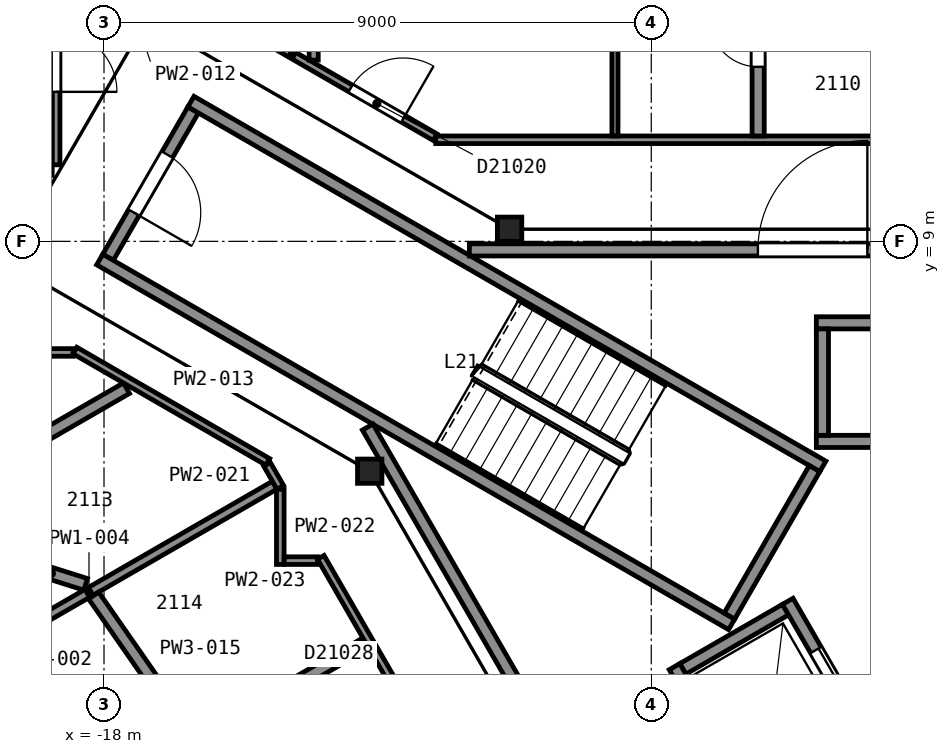
"""IFC4 building model, lengths in metres.
Left out: names, types, materials, properties, quantities, classifications, styles, units other than length and angle.
Written with IfcOpenShell. Run it as: python <this file> out.ifc"""

import sys

from ifc_helpers import new_model, si_unit, direction, frame, frame_2d, origin, origin_2d, place, context, subcontext, project, spatial, rectangle, i_section, extrude, element, fill, save


model = new_model("IFC4")
c1 = context("Model", 3, precision=1e-05, world=origin(), true_north=direction((0.0, 1.0)))
c2 = subcontext(c1, "Body", "Model", "MODEL_VIEW")
j1 = project(units=[si_unit("LENGTHUNIT", "METRE"), si_unit("PLANEANGLEUNIT", "RADIAN")], contexts=[c1])
p1 = place(None, origin())
s1 = spatial("IfcSite", under=j1, at=p1, CompositionType="ELEMENT")
p2 = place(p1, origin())
s2 = spatial("IfcBuilding", under=s1, at=p2, CompositionType="ELEMENT")
p3 = place(p2, frame((0.0, 0.0, 92.8)))
s3 = spatial("IfcBuildingStorey", under=s2, at=p3, CompositionType="ELEMENT", Elevation=92.8)
for number, where, z_axis, x_axis in (
    (1, (-11.33, 9.2, 0.0), (0.0, 0.0, 1.0), (1.0, 0.0, 0.0)),
    (2, (-13.63, 5.22, 0.0), (0.0, 0.0, 1.0), (1.0, 0.0, 0.0)),
):
    element("IfcColumn", number, at=place(p3, frame(where, z_axis=z_axis, x_axis=x_axis)), inside=s3, PredefinedType="COLUMN", context=c2, shape_type="SweptSolid", body=[
        extrude(i_section(OverallWidth=0.401, OverallDepth=0.399, WebThickness=0.025, FlangeThickness=0.04, FilletRadius=0.015, at=origin_2d()), origin(), (0.0, 0.0, 1.0), 3.6),
    ])
p4 = place(p3, frame((-16.534, 11.162, 0.0), z_axis=(0.0, 0.0, 1.0), x_axis=(-0.49998411664, -0.866034573852, 0.0)))
e3 = element("IfcWall", 3, at=p4, inside=s3, PredefinedType="PARTITIONING", context=c2, shape_type="SweptSolid", body=[
    extrude(rectangle(XDim=2.8, YDim=0.2, at=frame_2d((1.4, 0.0))), origin(), (0.0, 0.0, 1.0), 3.35),
])
p5 = place(p4, frame((0.85, 0.0, 0.0)))
e4 = element("IfcOpeningElement", 4, at=p5, cuts=e3, PredefinedType="OPENING", context=c2, shape_type="SweptSolid", body=[
    extrude(rectangle(XDim=1.1, YDim=2.1, at=frame_2d((0.55, 1.05))), frame((0.0, 0.11, 0.0), z_axis=(0.0, -1.0, 0.0), x_axis=(1.0, 0.0, 0.0)), (0.0, 0.0, 1.0), 0.22),
])
for number, where, z_axis, x_axis in (
    (5, (-7.678, 2.701, 0.0), (0.0, 0.0, 1.0), (-0.866, 0.5, 0.0)),
    (6, (-6.178, 5.299, 0.0), (0.0, 0.0, 1.0), (-0.866, 0.5, 0.0)),
):
    element("IfcWall", number, at=place(p3, frame(where, z_axis=z_axis, x_axis=x_axis)), inside=s3, PredefinedType="PARTITIONING", context=c2, shape_type="SweptSolid", body=[
        extrude(rectangle(XDim=12.0, YDim=0.2, at=frame_2d((6.0, 0.0))), origin(), (0.0, 0.0, 1.0), 3.35),
    ])
p6 = place(p3, frame((-6.315, 5.262, 0.0), z_axis=(0.0, 0.0, 1.0), x_axis=(-0.500049511043, -0.865996816683, 0.0)))
e7 = element("IfcWall", 7, at=p6, inside=s3, PredefinedType="PARTITIONING", context=c2, shape_type="SweptSolid", body=[
    extrude(rectangle(XDim=2.8, YDim=0.2, at=frame_2d((1.4, 0.0))), origin(), (0.0, 0.0, 1.0), 3.35),
])
for number, where, z_axis, x_axis in (
    (8, (-6.285, 5.71, 0.0), (0.0, 0.0, 1.0), (1.0, 0.0, 0.0)),
    (9, (-6.285, 7.66, 0.0), (0.0, 0.0, 1.0), (1.0, 0.0, 0.0)),
):
    element("IfcWall", number, at=place(p3, frame(where, z_axis=z_axis, x_axis=x_axis)), inside=s3, PredefinedType="PARTITIONING", context=c2, shape_type="SweptSolid", body=[
        extrude(rectangle(XDim=2.35, YDim=0.2, at=frame_2d((1.175, 0.0))), origin(), (0.0, 0.0, 1.0), 3.6),
    ])
p7 = place(p3, frame((-8.48, 1.969, 0.0), z_axis=(0.0, 0.0, 1.0), x_axis=(0.866000020948, 0.500043961785, 0.0)))
e10 = element("IfcWall", 10, at=p7, inside=s3, PredefinedType="PARTITIONING", context=c2, shape_type="SweptSolid", body=[
    extrude(rectangle(XDim=1.95, YDim=0.2, at=frame_2d((0.975, 0.0))), origin(), (0.0, 0.0, 1.0), 3.6),
])
p8 = place(p3, frame((-6.185, 5.81, 0.0), z_axis=(0.0, 0.0, 1.0), x_axis=(0.0, 1.0, 0.0)))
e11 = element("IfcWall", 11, at=p8, inside=s3, PredefinedType="PARTITIONING", context=c2, shape_type="SweptSolid", body=[
    extrude(rectangle(XDim=1.75, YDim=0.2, at=frame_2d((0.875, 0.0))), origin(), (0.0, 0.0, 1.0), 3.6),
])
p9 = place(p3, frame((-5.28, 0.525, 0.0), z_axis=(0.0, 0.0, 1.0), x_axis=(-0.500037662692, 0.866003658127, 0.0)))
e12 = element("IfcWall", 12, at=p9, inside=s3, PredefinedType="PARTITIONING", context=c2, shape_type="SweptSolid", body=[
    extrude(rectangle(XDim=2.95, YDim=0.2, at=frame_2d((1.475, 0.0))), origin(), (0.0, 0.0, 1.0), 3.6),
])
p10 = place(p9, frame((0.925, 0.0, 0.0)))
e13 = element("IfcOpeningElement", 13, at=p10, cuts=e12, PredefinedType="OPENING", context=c2, shape_type="SweptSolid", body=[
    extrude(rectangle(XDim=1.1, YDim=2.1, at=frame_2d((0.55, 1.05))), frame((0.0, 0.11, 0.0), z_axis=(0.0, -1.0, 0.0), x_axis=(1.0, 0.0, 0.0)), (0.0, 0.0, 1.0), 0.22),
])
p11 = place(p3, frame((-7.242, -0.376, 0.0), z_axis=(0.0, 0.0, 1.0), x_axis=(-0.499996545922, 0.866027397988, 0.0)))
e14 = element("IfcWall", 14, at=p11, inside=s3, PredefinedType="PARTITIONING", context=c2, shape_type="SweptSolid", body=[
    extrude(rectangle(XDim=2.75, YDim=0.2, at=frame_2d((1.375, 0.0))), origin(), (0.0, 0.0, 1.0), 3.6),
])
p12 = place(p3, frame((-13.664, 5.946, 0.0), z_axis=(0.0, 0.0, 1.0), x_axis=(0.499994327219, -0.866028678941, 0.0)))
e15 = element("IfcWall", 15, at=p12, inside=s3, PredefinedType="PARTITIONING", context=c2, shape_type="SweptSolid", body=[
    extrude(rectangle(XDim=23.968, YDim=0.2, at=frame_2d((11.984, 0.0))), origin(), (0.0, 0.0, 1.0), 3.35),
])
p13 = place(p3, frame((0.263, 8.86, 0.0), z_axis=(0.0, 0.0, 1.0), x_axis=(-1.0, 0.0, 0.0)))
e16 = element("IfcWall", 16, at=p13, inside=s3, PredefinedType="PARTITIONING", context=c2, shape_type="SweptSolid", body=[
    extrude(rectangle(XDim=12.254, YDim=0.2, at=frame_2d((6.127, 0.0))), origin(), (0.0, 0.0, 1.0), 3.35),
])
p14 = place(p13, frame((5.709, 0.0, 0.0)))
e17 = element("IfcOpeningElement", 17, at=p14, cuts=e16, PredefinedType="OPENING", context=c2, shape_type="SweptSolid", body=[
    extrude(rectangle(XDim=1.8, YDim=2.1, at=frame_2d((0.9, 1.05))), frame((0.0, 0.11, 0.0), z_axis=(0.0, -1.0, 0.0), x_axis=(1.0, 0.0, 0.0)), (0.0, 0.0, 1.0), 0.22),
])
p15 = place(p3, frame((-21.263, 4.296, 0.0), z_axis=(0.0, 0.0, 1.0), x_axis=(0.95341383314, -0.301665481582, 0.0)))
e18 = element("IfcWall", 18, at=p15, inside=s3, PredefinedType="PARTITIONING", context=c2, shape_type="SweptSolid", body=[
    extrude(rectangle(XDim=3.106, YDim=0.2, at=frame_2d((1.553, 0.0))), origin(), (0.0, 0.0, 1.0), 2.613),
])
p16 = place(p15, frame((1.125, 0.0, 0.0)))
e19 = element("IfcOpeningElement", 19, at=p16, cuts=e18, PredefinedType="OPENING", context=c2, shape_type="SweptSolid", body=[
    extrude(rectangle(XDim=0.8, YDim=2.1, at=frame_2d((0.4, 1.05))), frame((0.0, 0.11, 0.0), z_axis=(0.0, -1.0, 0.0), x_axis=(1.0, 0.0, 0.0)), (0.0, 0.0, 1.0), 0.22),
])
p17 = place(p3, frame((-21.565, 4.314, 0.0), z_axis=(0.0, 0.0, 1.0), x_axis=(0.866058501026, 0.499942669514, 0.0)))
e20 = element("IfcWall", 20, at=p17, inside=s3, PredefinedType="PARTITIONING", context=c2, shape_type="SweptSolid", body=[
    extrude(rectangle(XDim=4.542, YDim=0.2, at=frame_2d((2.271, 0.0))), origin(), (0.0, 0.0, 1.0), 2.613),
])
p18 = place(p3, frame((-21.301, 1.464, 0.0), z_axis=(0.0, 0.0, 1.0), x_axis=(0.866055299146, 0.49994821614, 0.0)))
e21 = element("IfcWall", 21, at=p18, inside=s3, PredefinedType="PARTITIONING", context=c2, shape_type="SweptSolid", body=[
    extrude(rectangle(XDim=7.052, YDim=0.15, at=frame_2d((3.526, 0.0))), origin(), (0.0, 0.0, 1.0), 2.613),
])
p19 = place(p3, frame((-21.022, 7.173, 0.0), z_axis=(0.0, 0.0, 1.0), x_axis=(1.0, 0.0, 0.0)))
e22 = element("IfcWall", 22, at=p19, inside=s3, PredefinedType="PARTITIONING", context=c2, shape_type="SweptSolid", body=[
    extrude(rectangle(XDim=2.513, YDim=0.125, at=frame_2d((1.256, 0.0))), origin(), (0.0, 0.0, 1.0), 2.613),
])
p20 = place(p3, frame((-18.787, 10.259, 0.0), z_axis=(0.0, 0.0, 1.0), x_axis=(0.0, 1.0, 0.0)))
e23 = element("IfcWall", 23, at=p20, inside=s3, PredefinedType="PARTITIONING", context=c2, shape_type="SweptSolid", body=[
    extrude(rectangle(XDim=3.93, YDim=0.125, at=frame_2d((1.965, 0.0))), origin(), (0.0, 0.0, 1.0), 2.613),
])
p21 = place(p20, frame((1.2, 0.0, 0.0)))
e24 = element("IfcOpeningElement", 24, at=p21, cuts=e23, PredefinedType="OPENING", context=c2, shape_type="SweptSolid", body=[
    extrude(rectangle(XDim=1.0, YDim=2.1, at=frame_2d((0.5, 1.05))), frame((0.0, 0.073, 0.0), z_axis=(0.0, -1.0, 0.0), x_axis=(1.0, 0.0, 0.0)), (0.0, 0.0, 1.0), 0.145),
])
p22 = place(p3, frame((-18.478, 7.204, 0.0), z_axis=(0.0, 0.0, 1.0), x_axis=(0.866011320536, -0.500024392108, 0.0)))
e25 = element("IfcWall", 25, at=p22, inside=s3, PredefinedType="PARTITIONING", context=c2, shape_type="SweptSolid", body=[
    extrude(rectangle(XDim=3.663, YDim=0.125, at=frame_2d((1.832, 0.0))), origin(), (0.0, 0.0, 1.0), 2.613),
])
p23 = place(p3, frame((-18.17, 3.175, 0.0), z_axis=(0.0, 0.0, 1.0), x_axis=(0.571541682724, -0.820573034476, 0.0)))
e26 = element("IfcWall", 26, at=p23, inside=s3, PredefinedType="PARTITIONING", context=c2, shape_type="SweptSolid", body=[
    extrude(rectangle(XDim=2.818, YDim=0.2, at=frame_2d((1.409, 0.0))), origin(), (0.0, 0.0, 1.0), 2.613),
])
p24 = place(p3, frame((-16.583, 0.723, 0.0), z_axis=(0.0, 0.0, 1.0), x_axis=(0.866001642064, 0.500041154249, 0.0)))
e27 = element("IfcWall", 27, at=p24, inside=s3, PredefinedType="PARTITIONING", context=c2, shape_type="SweptSolid", body=[
    extrude(rectangle(XDim=3.338, YDim=0.2, at=frame_2d((1.669, 0.0))), origin(), (0.0, 0.0, 1.0), 2.613),
])
p25 = place(p24, frame((1.3, 0.0, 0.0)))
e28 = element("IfcOpeningElement", 28, at=p25, cuts=e27, PredefinedType="OPENING", context=c2, shape_type="SweptSolid", body=[
    extrude(rectangle(XDim=0.9, YDim=2.1, at=frame_2d((0.45, 1.05))), frame((0.0, 0.11, 0.0), z_axis=(0.0, -1.0, 0.0), x_axis=(1.0, 0.0, 0.0)), (0.0, 0.0, 1.0), 0.22),
])
p26 = place(p3, frame((-15.867, 12.625, 0.0), z_axis=(0.0, 0.0, 1.0), x_axis=(0.86603035395, -0.499991425964, 0.0)))
e29 = element("IfcWall", 29, at=p26, inside=s3, PredefinedType="PARTITIONING", context=c2, shape_type="SweptSolid", body=[
    extrude(rectangle(XDim=3.824, YDim=0.125, at=frame_2d((1.912, 0.0))), origin(), (0.0, 0.0, 1.0), 2.613),
])
p27 = place(p26, frame((2.219, 0.0, 0.0)))
e30 = element("IfcOpeningElement", 30, at=p27, cuts=e29, PredefinedType="OPENING", context=c2, shape_type="SweptSolid", body=[
    extrude(rectangle(XDim=1.0, YDim=2.1, at=frame_2d((0.5, 1.05))), frame((0.0, 0.073, 0.0), z_axis=(0.0, -1.0, 0.0), x_axis=(1.0, 0.0, 0.0)), (0.0, 0.0, 1.0), 0.145),
])
p28 = place(p3, frame((-15.318, 5.33, 0.0), z_axis=(0.0, 0.0, 1.0), x_axis=(0.499836277606, -0.86611990832, 0.0)))
e31 = element("IfcWall", 31, at=p28, inside=s3, PredefinedType="PARTITIONING", context=c2, shape_type="SweptSolid", body=[
    extrude(rectangle(XDim=0.433, YDim=0.125, at=frame_2d((0.217, 0.0))), origin(), (0.0, 0.0, 1.0), 2.613),
])
p29 = place(p3, frame((-15.101, 3.687, 0.0), z_axis=(0.0, 0.0, 1.0), x_axis=(0.0, 1.0, 0.0)))
e32 = element("IfcWall", 32, at=p29, inside=s3, PredefinedType="PARTITIONING", context=c2, shape_type="SweptSolid", body=[
    extrude(rectangle(XDim=1.236, YDim=0.125, at=frame_2d((0.618, 0.0))), origin(), (0.0, 0.0, 1.0), 2.613),
])
p30 = place(p3, frame((-15.036, 3.749, 0.0), z_axis=(0.0, 0.0, 1.0), x_axis=(1.0, 0.0, 0.0)))
e33 = element("IfcWall", 33, at=p30, inside=s3, PredefinedType="PARTITIONING", context=c2, shape_type="SweptSolid", body=[
    extrude(rectangle(XDim=0.547, YDim=0.125, at=frame_2d((0.273, 0.0))), origin(), (0.0, 0.0, 1.0), 2.613),
])
p31 = place(p3, frame((-14.552, 11.981, 0.0), z_axis=(0.0, 0.0, 1.0), x_axis=(0.0, 1.0, 0.0)))
e34 = element("IfcWall", 34, at=p31, inside=s3, PredefinedType="PARTITIONING", context=c2, shape_type="SweptSolid", body=[
    extrude(rectangle(XDim=5.734, YDim=0.15, at=frame_2d((2.867, 0.0))), origin(), (0.0, 0.0, 1.0), 2.613),
])
p32 = place(p3, frame((-9.41, -4.902, 0.0), z_axis=(0.0, 0.0, 1.0), x_axis=(-0.499971244726, 0.866042005013, 0.0)))
e35 = element("IfcWall", 35, at=p32, inside=s3, PredefinedType="PARTITIONING", context=c2, shape_type="SweptSolid", body=[
    extrude(rectangle(XDim=10.052, YDim=0.125, at=frame_2d((5.026, 0.0))), origin(), (0.0, 0.0, 1.0), 2.613),
])
p33 = place(p32, frame((6.608, 0.0, 0.0)))
e36 = element("IfcOpeningElement", 36, at=p33, cuts=e35, PredefinedType="OPENING", context=c2, shape_type="SweptSolid", body=[
    extrude(rectangle(XDim=1.0, YDim=2.1, at=frame_2d((0.5, 1.05))), frame((0.0, 0.073, 0.0), z_axis=(0.0, -1.0, 0.0), x_axis=(1.0, 0.0, 0.0)), (0.0, 0.0, 1.0), 0.145),
])
p34 = place(p32, frame((2.989, 0.0, 0.0)))
e37 = element("IfcOpeningElement", 37, at=p34, cuts=e35, PredefinedType="OPENING", context=c2, shape_type="SweptSolid", body=[
    extrude(rectangle(XDim=1.0, YDim=2.1, at=frame_2d((0.5, 1.05))), frame((0.0, 0.073, 0.0), z_axis=(0.0, -1.0, 0.0), x_axis=(1.0, 0.0, 0.0)), (0.0, 0.0, 1.0), 0.145),
])
p35 = place(p3, frame((-12.544, 10.671, 0.0), z_axis=(0.0, 0.0, 1.0), x_axis=(1.0, 0.0, 0.0)))
e38 = element("IfcWall", 38, at=p35, inside=s3, PredefinedType="PARTITIONING", context=c2, shape_type="SweptSolid", body=[
    extrude(rectangle(XDim=25.089, YDim=0.125, at=frame_2d((12.544, 0.0))), origin(), (0.0, 0.0, 1.0), 2.613),
])
p36 = place(p35, frame((18.962, 0.0, 0.0)))
e39 = element("IfcOpeningElement", 39, at=p36, cuts=e38, PredefinedType="OPENING", context=c2, shape_type="SweptSolid", body=[
    extrude(rectangle(XDim=0.9, YDim=2.1, at=frame_2d((0.45, 1.05))), frame((0.0, 0.073, 0.0), z_axis=(0.0, -1.0, 0.0), x_axis=(1.0, 0.0, 0.0)), (0.0, 0.0, 1.0), 0.145),
])
p37 = place(p35, frame((14.857, 0.0, 0.0)))
e40 = element("IfcOpeningElement", 40, at=p37, cuts=e38, PredefinedType="OPENING", context=c2, shape_type="SweptSolid", body=[
    extrude(rectangle(XDim=1.0, YDim=2.1, at=frame_2d((0.5, 1.05))), frame((0.0, 0.073, 0.0), z_axis=(0.0, -1.0, 0.0), x_axis=(1.0, 0.0, 0.0)), (0.0, 0.0, 1.0), 0.145),
])
p38 = place(p3, frame((-9.597, 17.715, 0.0), z_axis=(0.0, 0.0, 1.0), x_axis=(0.0, -1.0, 0.0)))
e41 = element("IfcWall", 41, at=p38, inside=s3, PredefinedType="PARTITIONING", context=c2, shape_type="SweptSolid", body=[
    extrude(rectangle(XDim=6.982, YDim=0.1, at=frame_2d((3.491, 0.0))), origin(), (0.0, 0.0, 1.0), 2.613),
])
p39 = place(p38, frame((3.094, 0.0, 0.0)))
e42 = element("IfcOpeningElement", 42, at=p39, cuts=e41, PredefinedType="OPENING", context=c2, shape_type="SweptSolid", body=[
    extrude(rectangle(XDim=0.9, YDim=2.1, at=frame_2d((0.45, 1.05))), frame((0.0, 0.06, 0.0), z_axis=(0.0, -1.0, 0.0), x_axis=(1.0, 0.0, 0.0)), (0.0, 0.0, 1.0), 0.12),
])
p40 = place(p3, frame((-7.242, 13.971, 0.0), z_axis=(0.0, 0.0, 1.0), x_axis=(0.0, -1.0, 0.0)))
e43 = element("IfcWall", 43, at=p40, inside=s3, PredefinedType="PARTITIONING", context=c2, shape_type="SweptSolid", body=[
    extrude(rectangle(XDim=3.238, YDim=0.2, at=frame_2d((1.619, 0.0))), origin(), (0.0, 0.0, 1.0), 2.613),
])
p41 = place(p40, frame((1.3, 0.0, 0.0)))
e44 = element("IfcOpeningElement", 44, at=p41, cuts=e43, PredefinedType="OPENING", context=c2, shape_type="SweptSolid", body=[
    extrude(rectangle(XDim=0.8, YDim=2.1, at=frame_2d((0.4, 1.05))), frame((0.0, 0.11, 0.0), z_axis=(0.0, -1.0, 0.0), x_axis=(1.0, 0.0, 0.0)), (0.0, 0.0, 1.0), 0.22),
])
p42 = place(p5, origin())
e45 = element("IfcDoor", 45, at=p42, inside=s3, OperationType="SINGLE_SWING_RIGHT", PredefinedType="DOOR", context=c2, shape_type="SweptSolid", body=[
    extrude(rectangle(XDim=1.1, YDim=2.1, at=frame_2d((0.55, 1.05))), frame((0.0, 0.025, 0.0), z_axis=(0.0, -1.0, 0.0), x_axis=(1.0, 0.0, 0.0)), (0.0, 0.0, 1.0), 0.05),
])
fill(e4, e45)
p43 = place(p10, origin())
e46 = element("IfcDoor", 46, at=p43, inside=s3, OperationType="SLIDING_TO_LEFT", PredefinedType="DOOR", context=c2, shape_type="SweptSolid", body=[
    extrude(rectangle(XDim=1.1, YDim=2.1, at=frame_2d((0.55, 1.05))), frame((0.0, 0.025, 0.0), z_axis=(0.0, -1.0, 0.0), x_axis=(1.0, 0.0, 0.0)), (0.0, 0.0, 1.0), 0.05),
])
fill(e13, e46)
p44 = place(p14, origin())
e47 = element("IfcDoor", 47, at=p44, inside=s3, OperationType="DOUBLE_DOOR_SINGLE_SWING", PredefinedType="DOOR", context=c2, shape_type="SweptSolid", body=[
    extrude(rectangle(XDim=1.8, YDim=2.1, at=frame_2d((0.9, 1.05))), frame((0.0, 0.025, 0.0), z_axis=(0.0, -1.0, 0.0), x_axis=(1.0, 0.0, 0.0)), (0.0, 0.0, 1.0), 0.05),
])
fill(e17, e47)
p45 = place(p21, origin())
e48 = element("IfcDoor", 48, at=p45, inside=s3, OperationType="SINGLE_SWING_LEFT", PredefinedType="DOOR", context=c2, shape_type="SweptSolid", body=[
    extrude(rectangle(XDim=1.0, YDim=2.1, at=frame_2d((0.5, 1.05))), frame((0.0, 0.025, 0.0), z_axis=(0.0, -1.0, 0.0), x_axis=(1.0, 0.0, 0.0)), (0.0, 0.0, 1.0), 0.05),
])
fill(e24, e48)
p46 = place(p27, origin())
e49 = element("IfcDoor", 49, at=p46, inside=s3, OperationType="SINGLE_SWING_RIGHT", PredefinedType="DOOR", context=c2, shape_type="SweptSolid", body=[
    extrude(rectangle(XDim=1.0, YDim=2.1, at=frame_2d((0.5, 1.05))), frame((0.0, 0.025, 0.0), z_axis=(0.0, -1.0, 0.0), x_axis=(1.0, 0.0, 0.0)), (0.0, 0.0, 1.0), 0.05),
])
fill(e30, e49)
p47 = place(p41, origin())
e50 = element("IfcDoor", 50, at=p47, inside=s3, OperationType="SINGLE_SWING_LEFT", PredefinedType="DOOR", context=c2, shape_type="SweptSolid", body=[
    extrude(rectangle(XDim=0.8, YDim=2.1, at=frame_2d((0.4, 1.05))), frame((0.0, 0.025, 0.0), z_axis=(0.0, -1.0, 0.0), x_axis=(1.0, 0.0, 0.0)), (0.0, 0.0, 1.0), 0.05),
])
fill(e44, e50)
save(model, sys.argv[1])
